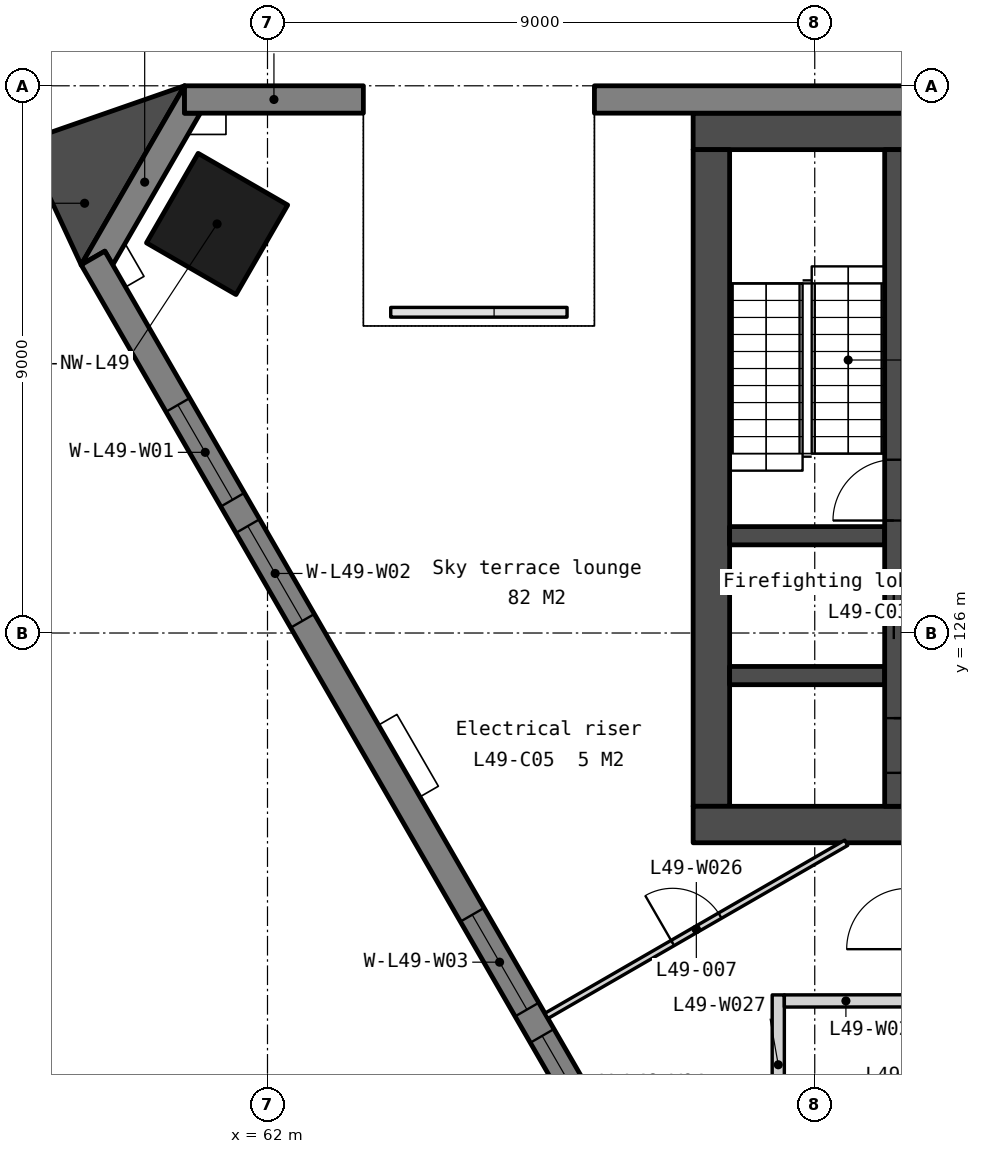
"""IFC4 building model, lengths in metres.
Left out: names, types, materials, properties, quantities, classifications, styles, units other than length and angle.
Written with IfcOpenShell. Run it as: python <this file> out.ifc"""

import sys

from ifc_helpers import new_model, si_unit, direction, frame, frame_2d, origin, origin_2d, place, context, subcontext, project, spatial, polyline, rectangle, outline, extrude, element, fill, save


model = new_model("IFC4")
c1 = context("Model", 3, precision=1e-05, world=origin(), true_north=direction((0.0, 1.0)))
c2 = subcontext(c1, "Body", "Model", "MODEL_VIEW")
j1 = project(units=[si_unit("LENGTHUNIT", "METRE"), si_unit("PLANEANGLEUNIT", "RADIAN")], contexts=[c1])
p1 = place(None, origin())
s1 = spatial("IfcSite", under=j1, at=p1, CompositionType="ELEMENT")
p2 = place(p1, origin())
s2 = spatial("IfcBuilding", under=s1, at=p2, CompositionType="ELEMENT")
p3 = place(p2, frame((0.0, 0.0, 195.8)))
s3 = spatial("IfcBuildingStorey", under=s2, at=p3, CompositionType="ELEMENT", Elevation=195.8)
p4 = place(p3, frame((61.171, 132.728, 0.0), z_axis=(0.0, 0.0, 1.0), x_axis=(-0.5, -0.866025403784, 0.0)))
e1 = element("IfcColumn", 1, at=p4, inside=s3, PredefinedType="COLUMN", context=c2, shape_type="SweptSolid", body=[
    extrude(rectangle(XDim=1.7, YDim=1.7, at=origin_2d()), origin(), (0.0, 0.0, 1.0), 3.9),
])
p5 = place(p3, frame((69.0, 134.25, 0.0), z_axis=(0.0, 0.0, 1.0), x_axis=(1.0, 0.0, 0.0)))
e2 = element("IfcWall", 2, at=p5, inside=s3, PredefinedType="SOLIDWALL", context=c2, shape_type="SweptSolid", body=[
    extrude(rectangle(XDim=22.0, YDim=0.6, at=frame_2d((11.0, 0.0))), origin(), (0.0, 0.0, 1.0), 3.75),
])
p6 = place(p3, frame((69.3, 133.95, 0.0), z_axis=(0.0, 0.0, 1.0), x_axis=(0.0, -1.0, 0.0)))
e3 = element("IfcWall", 3, at=p6, inside=s3, PredefinedType="SOLIDWALL", context=c2, shape_type="SweptSolid", body=[
    extrude(rectangle(XDim=10.8, YDim=0.6, at=frame_2d((5.4, 0.0))), origin(), (0.0, 0.0, 1.0), 3.75),
])
p7 = place(p3, frame((69.0, 122.85, 0.0), z_axis=(0.0, 0.0, 1.0), x_axis=(1.0, 0.0, 0.0)))
e4 = element("IfcWall", 4, at=p7, inside=s3, PredefinedType="SOLIDWALL", context=c2, shape_type="SweptSolid", body=[
    extrude(rectangle(XDim=22.0, YDim=0.6, at=frame_2d((11.0, 0.0))), origin(), (0.0, 0.0, 1.0), 3.75),
])
p8 = place(p7, frame((16.375, 0.0, 0.0)))
e5 = element("IfcOpeningElement", 5, at=p8, cuts=e4, PredefinedType="OPENING", context=c2, shape_type="SweptSolid", body=[
    extrude(rectangle(XDim=1.8, YDim=2.1, at=frame_2d((0.9, 1.05))), frame((0.0, 0.31, 0.0), z_axis=(0.0, -1.0, 0.0), x_axis=(1.0, 0.0, 0.0)), (0.0, 0.0, 1.0), 0.62),
])
p9 = place(p7, frame((3.825, 0.0, 0.0)))
e6 = element("IfcOpeningElement", 6, at=p9, cuts=e4, PredefinedType="OPENING", context=c2, shape_type="SweptSolid", body=[
    extrude(rectangle(XDim=1.8, YDim=2.1, at=frame_2d((0.9, 1.05))), frame((0.0, 0.31, 0.0), z_axis=(0.0, -1.0, 0.0), x_axis=(1.0, 0.0, 0.0)), (0.0, 0.0, 1.0), 0.62),
])
p10 = place(p7, frame((12.85, 0.0, 0.0)))
e7 = element("IfcOpeningElement", 7, at=p10, cuts=e4, PredefinedType="OPENING", context=c2, shape_type="SweptSolid", body=[
    extrude(rectangle(XDim=1.5, YDim=2.1, at=frame_2d((0.75, 1.05))), frame((0.0, 0.31, 0.0), z_axis=(0.0, -1.0, 0.0), x_axis=(1.0, 0.0, 0.0)), (0.0, 0.0, 1.0), 0.62),
])
for number, where, z_axis, x_axis in (
    (8, (69.6, 127.6, 0.0), (0.0, 0.0, 1.0), (1.0, 0.0, 0.0)),
    (9, (69.6, 125.3, 0.0), (0.0, 0.0, 1.0), (1.0, 0.0, 0.0)),
):
    element("IfcWall", number, at=place(p3, frame(where, z_axis=z_axis, x_axis=x_axis)), inside=s3, PredefinedType="SOLIDWALL", context=c2, shape_type="SweptSolid", body=[
        extrude(rectangle(XDim=2.55, YDim=0.3, at=frame_2d((1.275, 0.0))), origin(), (0.0, 0.0, 1.0), 3.75),
    ])
p11 = place(p3, frame((72.3, 133.95, 0.0), z_axis=(0.0, 0.0, 1.0), x_axis=(0.0, -1.0, 0.0)))
e10 = element("IfcWall", 10, at=p11, inside=s3, PredefinedType="SOLIDWALL", context=c2, shape_type="SweptSolid", body=[
    extrude(rectangle(XDim=10.8, YDim=0.3, at=frame_2d((5.4, 0.0))), origin(), (0.0, 0.0, 1.0), 3.75),
])
p12 = place(p11, frame((6.95, 0.0, 0.0)))
e11 = element("IfcOpeningElement", 11, at=p12, cuts=e10, PredefinedType="OPENING", context=c2, shape_type="SweptSolid", body=[
    extrude(rectangle(XDim=1.1, YDim=2.1, at=frame_2d((0.55, 1.05))), frame((0.0, 0.16, 0.0), z_axis=(0.0, -1.0, 0.0), x_axis=(1.0, 0.0, 0.0)), (0.0, 0.0, 1.0), 0.32),
])
p13 = place(p11, frame((9.35, 0.0, 0.0)))
e12 = element("IfcOpeningElement", 12, at=p13, cuts=e10, PredefinedType="OPENING", context=c2, shape_type="SweptSolid", body=[
    extrude(rectangle(XDim=0.9, YDim=2.1, at=frame_2d((0.45, 1.05))), frame((0.0, 0.16, 0.0), z_axis=(0.0, -1.0, 0.0), x_axis=(1.0, 0.0, 0.0)), (0.0, 0.0, 1.0), 0.32),
])
p14 = place(p11, frame((5.1, 0.0, 0.0)))
e13 = element("IfcOpeningElement", 13, at=p14, cuts=e10, PredefinedType="OPENING", context=c2, shape_type="SweptSolid", body=[
    extrude(rectangle(XDim=1.0, YDim=2.1, at=frame_2d((0.5, 1.05))), frame((0.0, 0.16, 0.0), z_axis=(0.0, -1.0, 0.0), x_axis=(1.0, 0.0, 0.0)), (0.0, 0.0, 1.0), 0.32),
])
p15 = place(p3, frame((0.0, 0.0, -0.15)))
e14 = element("IfcWall", 14, at=p15, inside=s3, PredefinedType="SOLIDWALL", context=c2, shape_type="SweptSolid", body=[
    extrude(outline(polyline([(60.635, 135.0), (60.635, 134.55), (60.895, 134.55), (59.455, 132.055), (59.325, 132.281), (58.935, 132.055), (60.635, 135.0)])), origin(), (0.0, 0.0, 1.0), 3.9),
])
p16 = place(p3, frame((99.365, 134.775, -0.15), z_axis=(0.0, 0.0, 1.0), x_axis=(-1.0, 0.0, 0.0)))
e15 = element("IfcWall", 15, at=p16, inside=s3, PredefinedType="SOLIDWALL", context=c2, shape_type="SweptSolid", body=[
    extrude(outline(polyline([(0.0, 0.0), (0.0, 3.9), (31.988, 3.9), (31.988, 0.0), (0.0, 0.0)])), frame((0.0, 0.225, 0.0), z_axis=(0.0, -1.0, 0.0), x_axis=(1.0, 0.0, 0.0)), (0.0, 0.0, 1.0), 0.45),
])
p17 = place(p16, frame((2.791, 0.0, 0.95)))
e16 = element("IfcOpeningElement", 16, at=p17, cuts=e15, PredefinedType="OPENING", context=c2, shape_type="SweptSolid", body=[
    extrude(rectangle(XDim=1.8, YDim=2.2, at=frame_2d((0.9, 1.1))), frame((0.0, 0.235, 0.0), z_axis=(0.0, -1.0, 0.0), x_axis=(1.0, 0.0, 0.0)), (0.0, 0.0, 1.0), 0.47),
])
p18 = place(p16, frame((5.091, 0.0, 0.95)))
e17 = element("IfcOpeningElement", 17, at=p18, cuts=e15, PredefinedType="OPENING", context=c2, shape_type="SweptSolid", body=[
    extrude(rectangle(XDim=1.8, YDim=2.2, at=frame_2d((0.9, 1.1))), frame((0.0, 0.235, 0.0), z_axis=(0.0, -1.0, 0.0), x_axis=(1.0, 0.0, 0.0)), (0.0, 0.0, 1.0), 0.47),
])
p19 = place(p16, frame((12.473, 0.0, 0.95)))
e18 = element("IfcOpeningElement", 18, at=p19, cuts=e15, PredefinedType="OPENING", context=c2, shape_type="SweptSolid", body=[
    extrude(rectangle(XDim=1.8, YDim=2.2, at=frame_2d((0.9, 1.1))), frame((0.0, 0.235, 0.0), z_axis=(0.0, -1.0, 0.0), x_axis=(1.0, 0.0, 0.0)), (0.0, 0.0, 1.0), 0.47),
])
p20 = place(p16, frame((14.773, 0.0, 0.95)))
e19 = element("IfcOpeningElement", 19, at=p20, cuts=e15, PredefinedType="OPENING", context=c2, shape_type="SweptSolid", body=[
    extrude(rectangle(XDim=1.8, YDim=2.2, at=frame_2d((0.9, 1.1))), frame((0.0, 0.235, 0.0), z_axis=(0.0, -1.0, 0.0), x_axis=(1.0, 0.0, 0.0)), (0.0, 0.0, 1.0), 0.47),
])
p21 = place(p16, frame((22.156, 0.0, 0.95)))
e20 = element("IfcOpeningElement", 20, at=p21, cuts=e15, PredefinedType="OPENING", context=c2, shape_type="SweptSolid", body=[
    extrude(rectangle(XDim=1.8, YDim=2.2, at=frame_2d((0.9, 1.1))), frame((0.0, 0.235, 0.0), z_axis=(0.0, -1.0, 0.0), x_axis=(1.0, 0.0, 0.0)), (0.0, 0.0, 1.0), 0.47),
])
p22 = place(p16, frame((24.456, 0.0, 0.95)))
e21 = element("IfcOpeningElement", 21, at=p22, cuts=e15, PredefinedType="OPENING", context=c2, shape_type="SweptSolid", body=[
    extrude(rectangle(XDim=1.8, YDim=2.2, at=frame_2d((0.9, 1.1))), frame((0.0, 0.235, 0.0), z_axis=(0.0, -1.0, 0.0), x_axis=(1.0, 0.0, 0.0)), (0.0, 0.0, 1.0), 0.47),
])
p23 = place(p3, frame((63.576, 134.775, -0.15), z_axis=(0.0, 0.0, 1.0), x_axis=(-1.0, 0.0, 0.0)))
e22 = element("IfcWall", 22, at=p23, inside=s3, PredefinedType="SOLIDWALL", context=c2, shape_type="SweptSolid", body=[
    extrude(outline(polyline([(2.941, 3.9), (2.941, 0.0), (0.0, 0.0), (0.0, 3.9), (2.941, 3.9)])), frame((0.0, 0.225, 0.0), z_axis=(0.0, -1.0, 0.0), x_axis=(1.0, 0.0, 0.0)), (0.0, 0.0, 1.0), 0.45),
])
p24 = place(p3, frame((59.13, 132.168, -0.15), z_axis=(0.0, 0.0, 1.0), x_axis=(0.500002199942, -0.866024133644, 0.0)))
e23 = element("IfcWall", 23, at=p24, inside=s3, PredefinedType="SOLIDWALL", context=c2, shape_type="SweptSolid", body=[
    extrude(outline(polyline([(38.729, 0.0), (38.729, 3.9), (0.0, 3.9), (0.0, 0.0), (38.729, 0.0)])), frame((0.0, 0.225, 0.0), z_axis=(0.0, -1.0, 0.0), x_axis=(1.0, 0.0, 0.0)), (0.0, 0.0, 1.0), 0.45),
])
p25 = place(p24, frame((2.791, 0.0, 0.95)))
e24 = element("IfcOpeningElement", 24, at=p25, cuts=e23, PredefinedType="OPENING", context=c2, shape_type="SweptSolid", body=[
    extrude(rectangle(XDim=1.8, YDim=2.2, at=frame_2d((0.9, 1.1))), frame((0.0, 0.235, 0.0), z_axis=(0.0, -1.0, 0.0), x_axis=(1.0, 0.0, 0.0)), (0.0, 0.0, 1.0), 0.47),
])
p26 = place(p24, frame((5.091, 0.0, 0.95)))
e25 = element("IfcOpeningElement", 25, at=p26, cuts=e23, PredefinedType="OPENING", context=c2, shape_type="SweptSolid", body=[
    extrude(rectangle(XDim=1.8, YDim=2.2, at=frame_2d((0.9, 1.1))), frame((0.0, 0.235, 0.0), z_axis=(0.0, -1.0, 0.0), x_axis=(1.0, 0.0, 0.0)), (0.0, 0.0, 1.0), 0.47),
])
p27 = place(p24, frame((12.473, 0.0, 0.95)))
e26 = element("IfcOpeningElement", 26, at=p27, cuts=e23, PredefinedType="OPENING", context=c2, shape_type="SweptSolid", body=[
    extrude(rectangle(XDim=1.8, YDim=2.2, at=frame_2d((0.9, 1.1))), frame((0.0, 0.235, 0.0), z_axis=(0.0, -1.0, 0.0), x_axis=(1.0, 0.0, 0.0)), (0.0, 0.0, 1.0), 0.47),
])
p28 = place(p24, frame((14.773, 0.0, 0.95)))
e27 = element("IfcOpeningElement", 27, at=p28, cuts=e23, PredefinedType="OPENING", context=c2, shape_type="SweptSolid", body=[
    extrude(rectangle(XDim=1.8, YDim=2.2, at=frame_2d((0.9, 1.1))), frame((0.0, 0.235, 0.0), z_axis=(0.0, -1.0, 0.0), x_axis=(1.0, 0.0, 0.0)), (0.0, 0.0, 1.0), 0.47),
])
p29 = place(p24, frame((22.156, 0.0, 0.95)))
e28 = element("IfcOpeningElement", 28, at=p29, cuts=e23, PredefinedType="OPENING", context=c2, shape_type="SweptSolid", body=[
    extrude(rectangle(XDim=1.8, YDim=2.2, at=frame_2d((0.9, 1.1))), frame((0.0, 0.235, 0.0), z_axis=(0.0, -1.0, 0.0), x_axis=(1.0, 0.0, 0.0)), (0.0, 0.0, 1.0), 0.47),
])
p30 = place(p24, frame((24.456, 0.0, 0.95)))
e29 = element("IfcOpeningElement", 29, at=p30, cuts=e23, PredefinedType="OPENING", context=c2, shape_type="SweptSolid", body=[
    extrude(rectangle(XDim=1.8, YDim=2.2, at=frame_2d((0.9, 1.1))), frame((0.0, 0.235, 0.0), z_axis=(0.0, -1.0, 0.0), x_axis=(1.0, 0.0, 0.0)), (0.0, 0.0, 1.0), 0.47),
])
p31 = place(p24, frame((31.838, 0.0, 0.95)))
e30 = element("IfcOpeningElement", 30, at=p31, cuts=e23, PredefinedType="OPENING", context=c2, shape_type="SweptSolid", body=[
    extrude(rectangle(XDim=1.8, YDim=2.2, at=frame_2d((0.9, 1.1))), frame((0.0, 0.235, 0.0), z_axis=(0.0, -1.0, 0.0), x_axis=(1.0, 0.0, 0.0)), (0.0, 0.0, 1.0), 0.47),
])
p32 = place(p24, frame((34.138, 0.0, 0.95)))
e31 = element("IfcOpeningElement", 31, at=p32, cuts=e23, PredefinedType="OPENING", context=c2, shape_type="SweptSolid", body=[
    extrude(rectangle(XDim=1.8, YDim=2.2, at=frame_2d((0.9, 1.1))), frame((0.0, 0.235, 0.0), z_axis=(0.0, -1.0, 0.0), x_axis=(1.0, 0.0, 0.0)), (0.0, 0.0, 1.0), 0.47),
])
p33 = place(p3, frame((0.0, 0.0, -0.15)))
e32 = element("IfcWall", 32, at=p33, inside=s3, PredefinedType="SOLIDWALL", context=c2, shape_type="SweptSolid", body=[
    extrude(outline(polyline([(60.635, 135.0), (57.994, 134.081), (58.935, 132.055), (60.635, 135.0)])), origin(), (0.0, 0.0, 1.0), 3.9),
])
p34 = place(p3, frame((66.587, 119.703, 0.0), z_axis=(0.0, 0.0, 1.0), x_axis=(0.866023511746, 0.500003277092, 0.0)))
e33 = element("IfcWall", 33, at=p34, inside=s3, PredefinedType="PARTITIONING", context=c2, shape_type="SweptSolid", body=[
    extrude(rectangle(XDim=5.694, YDim=0.1, at=frame_2d((2.847, 0.0))), origin(), (0.0, 0.0, 1.0), 3.75),
])
p35 = place(p34, frame((2.397, 0.0, 0.0)))
e34 = element("IfcOpeningElement", 34, at=p35, cuts=e33, PredefinedType="OPENING", context=c2, shape_type="SweptSolid", body=[
    extrude(rectangle(XDim=0.9, YDim=2.1, at=frame_2d((0.45, 1.05))), frame((0.0, 0.06, 0.0), z_axis=(0.0, -1.0, 0.0), x_axis=(1.0, 0.0, 0.0)), (0.0, 0.0, 1.0), 0.12),
])
p36 = place(p3, frame((70.4, 117.75, 0.0), z_axis=(0.0, 0.0, 1.0), x_axis=(0.0, 1.0, 0.0)))
e35 = element("IfcWall", 35, at=p36, inside=s3, PredefinedType="PARTITIONING", context=c2, shape_type="SweptSolid", body=[
    extrude(rectangle(XDim=2.298, YDim=0.2, at=frame_2d((1.149, 0.0))), origin(), (0.0, 0.0, 1.0), 3.75),
])
p37 = place(p3, frame((70.5, 119.948, 0.0), z_axis=(0.0, 0.0, 1.0), x_axis=(0.999999534819, 0.00096455224, 0.0)))
e36 = element("IfcWall", 36, at=p37, inside=s3, PredefinedType="PARTITIONING", context=c2, shape_type="SweptSolid", body=[
    extrude(rectangle(XDim=2.025, YDim=0.2, at=frame_2d((1.012, 0.0))), origin(), (0.0, 0.0, 1.0), 3.75),
])
p38 = place(p12, origin())
e37 = element("IfcDoor", 37, at=p38, inside=s3, OperationType="SLIDING_TO_LEFT", PredefinedType="DOOR", context=c2, shape_type="SweptSolid", body=[
    extrude(rectangle(XDim=1.1, YDim=2.1, at=frame_2d((0.55, 1.05))), frame((0.0, 0.025, 0.0), z_axis=(0.0, -1.0, 0.0), x_axis=(1.0, 0.0, 0.0)), (0.0, 0.0, 1.0), 0.05),
])
fill(e11, e37)
p39 = place(p13, origin())
e38 = element("IfcDoor", 38, at=p39, inside=s3, OperationType="SINGLE_SWING_LEFT", PredefinedType="DOOR", context=c2, shape_type="SweptSolid", body=[
    extrude(rectangle(XDim=0.9, YDim=2.1, at=frame_2d((0.45, 1.05))), frame((0.0, 0.025, 0.0), z_axis=(0.0, -1.0, 0.0), x_axis=(1.0, 0.0, 0.0)), (0.0, 0.0, 1.0), 0.05),
])
fill(e12, e38)
p40 = place(p14, origin())
e39 = element("IfcDoor", 39, at=p40, inside=s3, OperationType="SINGLE_SWING_RIGHT", PredefinedType="DOOR", context=c2, shape_type="SweptSolid", body=[
    extrude(rectangle(XDim=1.0, YDim=2.1, at=frame_2d((0.5, 1.05))), frame((0.0, 0.025, 0.0), z_axis=(0.0, -1.0, 0.0), x_axis=(1.0, 0.0, 0.0)), (0.0, 0.0, 1.0), 0.05),
])
fill(e13, e39)
p41 = place(p25, origin())
e40 = element("IfcWindow", 40, at=p41, inside=s3, PartitioningType="SINGLE_PANEL", PredefinedType="WINDOW", context=c2, shape_type="SweptSolid", body=[
    extrude(rectangle(XDim=1.8, YDim=2.2, at=frame_2d((0.9, 1.1))), frame((0.0, 0.03, 0.0), z_axis=(0.0, -1.0, 0.0), x_axis=(1.0, 0.0, 0.0)), (0.0, 0.0, 1.0), 0.06),
])
fill(e24, e40)
p42 = place(p26, origin())
e41 = element("IfcWindow", 41, at=p42, inside=s3, PartitioningType="SINGLE_PANEL", PredefinedType="WINDOW", context=c2, shape_type="SweptSolid", body=[
    extrude(rectangle(XDim=1.8, YDim=2.2, at=frame_2d((0.9, 1.1))), frame((0.0, 0.03, 0.0), z_axis=(0.0, -1.0, 0.0), x_axis=(1.0, 0.0, 0.0)), (0.0, 0.0, 1.0), 0.06),
])
fill(e25, e41)
p43 = place(p27, origin())
e42 = element("IfcWindow", 42, at=p43, inside=s3, PartitioningType="SINGLE_PANEL", PredefinedType="WINDOW", context=c2, shape_type="SweptSolid", body=[
    extrude(rectangle(XDim=1.8, YDim=2.2, at=frame_2d((0.9, 1.1))), frame((0.0, 0.03, 0.0), z_axis=(0.0, -1.0, 0.0), x_axis=(1.0, 0.0, 0.0)), (0.0, 0.0, 1.0), 0.06),
])
fill(e26, e42)
p44 = place(p28, origin())
e43 = element("IfcWindow", 43, at=p44, inside=s3, PartitioningType="SINGLE_PANEL", PredefinedType="WINDOW", context=c2, shape_type="SweptSolid", body=[
    extrude(rectangle(XDim=1.8, YDim=2.2, at=frame_2d((0.9, 1.1))), frame((0.0, 0.03, 0.0), z_axis=(0.0, -1.0, 0.0), x_axis=(1.0, 0.0, 0.0)), (0.0, 0.0, 1.0), 0.06),
])
fill(e27, e43)
p45 = place(p35, origin())
e44 = element("IfcDoor", 44, at=p45, inside=s3, OperationType="SINGLE_SWING_LEFT", PredefinedType="DOOR", context=c2, shape_type="SweptSolid", body=[
    extrude(rectangle(XDim=0.9, YDim=2.1, at=frame_2d((0.45, 1.05))), frame((0.0, 0.025, 0.0), z_axis=(0.0, -1.0, 0.0), x_axis=(1.0, 0.0, 0.0)), (0.0, 0.0, 1.0), 0.05),
])
fill(e34, e44)
save(model, sys.argv[1])
